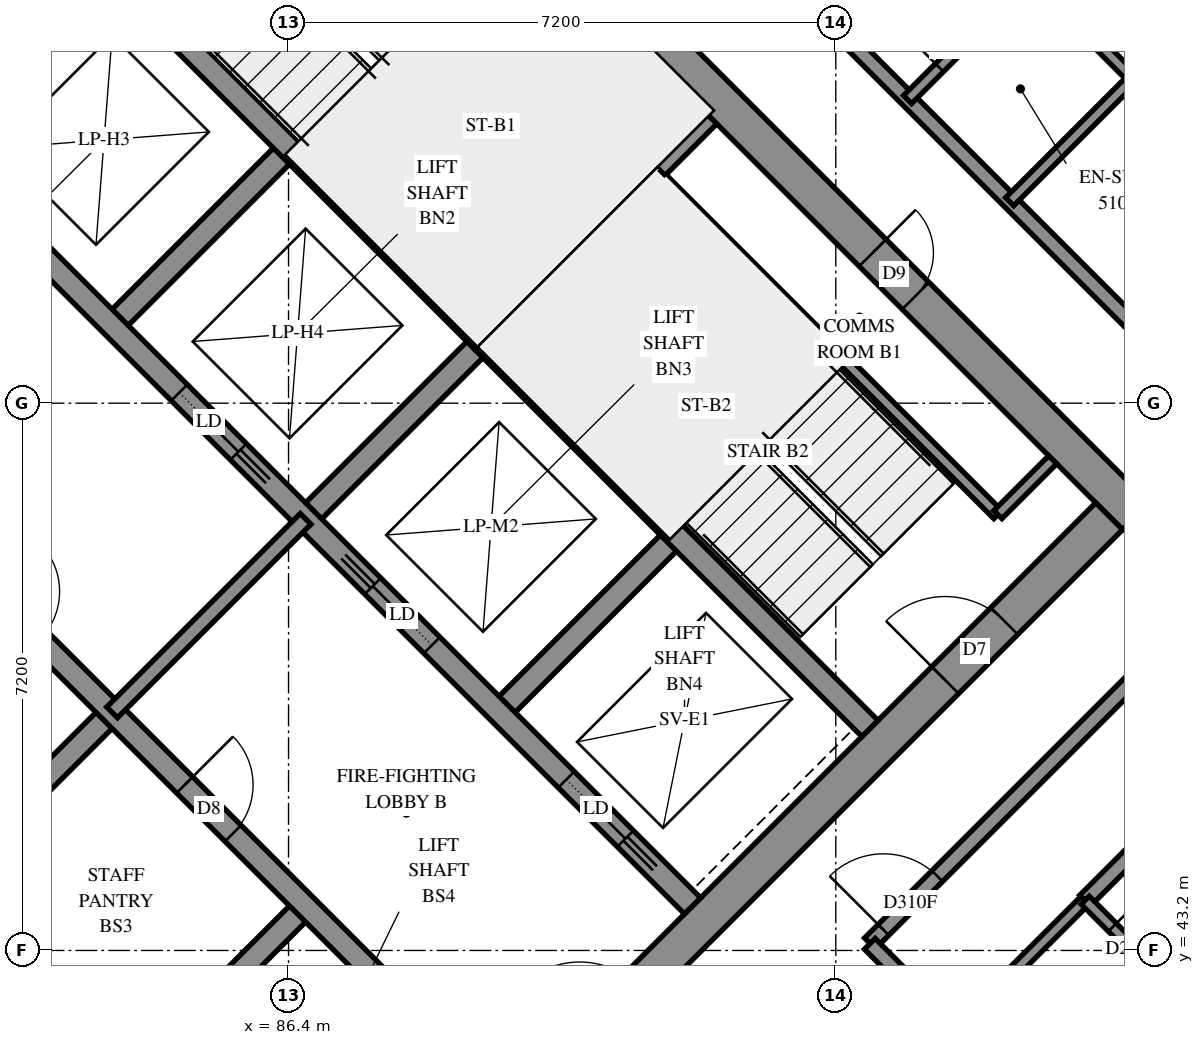
"""IFC4 building model, lengths in metres.
Left out: names, types, materials, properties, quantities, classifications, styles, units other than length and angle.
Written with IfcOpenShell. Run it as: python <this file> out.ifc"""

import sys

from ifc_helpers import new_model, si_unit, direction, frame, frame_2d, origin, place, context, subcontext, project, spatial, polyline, rectangle, outline, extrude, element, fill, save


model = new_model("IFC4")
c1 = context("Model", 3, precision=1e-05, world=origin(), true_north=direction((0.0, 1.0)))
c2 = subcontext(c1, "Body", "Model", "MODEL_VIEW")
j1 = project(units=[si_unit("LENGTHUNIT", "METRE"), si_unit("PLANEANGLEUNIT", "RADIAN")], contexts=[c1])
p1 = place(None, origin())
s1 = spatial("IfcSite", under=j1, at=p1, CompositionType="ELEMENT")
p2 = place(p1, origin())
s2 = spatial("IfcBuilding", under=s1, at=p2, CompositionType="ELEMENT")
p3 = place(p2, frame((0.0, 0.0, 189.6)))
s3 = spatial("IfcBuildingStorey", under=s2, at=p3, CompositionType="ELEMENT", Elevation=189.6)
p4 = place(p3, frame((76.124, 49.267, -0.3), z_axis=(0.0, 0.0, 1.0), x_axis=(0.7071067812, -0.7071067812, 0.0)))
e1 = element("IfcWall", 1, at=p4, inside=s3, PredefinedType="SHEAR", context=c2, shape_type="SweptSolid", body=[
    extrude(rectangle(XDim=15.4, YDim=0.5, at=frame_2d((7.7, 0.0))), origin(), (0.0, 0.0, 1.0), 2.7),
])
p5 = place(p3, frame((86.66, 59.802, -0.3), z_axis=(0.0, 0.0, 1.0), x_axis=(0.7071067812, -0.7071067812, 0.0)))
e2 = element("IfcWall", 2, at=p5, inside=s3, PredefinedType="SHEAR", context=c2, shape_type="SweptSolid", body=[
    extrude(rectangle(XDim=15.4, YDim=0.5, at=frame_2d((7.7, 0.0))), origin(), (0.0, 0.0, 1.0), 2.7),
])
p6 = place(p5, frame((10.5, 0.0, 0.3)))
e3 = element("IfcOpeningElement", 3, at=p6, cuts=e2, PredefinedType="OPENING", context=c2, shape_type="SweptSolid", body=[
    extrude(rectangle(XDim=0.8, YDim=2.1, at=frame_2d((0.4, 1.05))), frame((0.0, 0.26, 0.0), z_axis=(0.0, -1.0, 0.0), x_axis=(1.0, 0.0, 0.0)), (0.0, 0.0, 1.0), 0.52),
])
p7 = place(p3, frame((76.478, 49.267, -0.3), z_axis=(0.0, 0.0, 1.0), x_axis=(0.7071067812, 0.7071067812, 0.0)))
e4 = element("IfcWall", 4, at=p7, inside=s3, PredefinedType="SHEAR", context=c2, shape_type="SweptSolid", body=[
    extrude(rectangle(XDim=14.4, YDim=0.5, at=frame_2d((7.2, 0.0))), origin(), (0.0, 0.0, 1.0), 2.7),
])
p8 = place(p7, frame((4.55, 0.0, 0.3)))
e5 = element("IfcOpeningElement", 5, at=p8, cuts=e4, PredefinedType="OPENING", context=c2, shape_type="SweptSolid", body=[
    extrude(rectangle(XDim=1.1, YDim=2.1, at=frame_2d((0.55, 1.05))), frame((0.0, 0.26, 0.0), z_axis=(0.0, -1.0, 0.0), x_axis=(1.0, 0.0, 0.0)), (0.0, 0.0, 1.0), 0.52),
])
p9 = place(p7, frame((11.35, 0.0, 0.3)))
e6 = element("IfcOpeningElement", 6, at=p9, cuts=e4, PredefinedType="OPENING", context=c2, shape_type="SweptSolid", body=[
    extrude(rectangle(XDim=1.1, YDim=2.1, at=frame_2d((0.55, 1.05))), frame((0.0, 0.26, 0.0), z_axis=(0.0, -1.0, 0.0), x_axis=(1.0, 0.0, 0.0)), (0.0, 0.0, 1.0), 0.52),
])
p10 = place(p3, frame((87.013, 38.731, -0.3), z_axis=(0.0, 0.0, 1.0), x_axis=(0.7071067812, 0.7071067812, 0.0)))
e7 = element("IfcWall", 7, at=p10, inside=s3, PredefinedType="SHEAR", context=c2, shape_type="SweptSolid", body=[
    extrude(rectangle(XDim=14.4, YDim=0.5, at=frame_2d((7.2, 0.0))), origin(), (0.0, 0.0, 1.0), 2.7),
])
p11 = place(p10, frame((4.55, 0.0, 0.3)))
e8 = element("IfcOpeningElement", 8, at=p11, cuts=e7, PredefinedType="OPENING", context=c2, shape_type="SweptSolid", body=[
    extrude(rectangle(XDim=1.1, YDim=2.1, at=frame_2d((0.55, 1.05))), frame((0.0, 0.26, 0.0), z_axis=(0.0, -1.0, 0.0), x_axis=(1.0, 0.0, 0.0)), (0.0, 0.0, 1.0), 0.52),
])
p12 = place(p10, frame((11.35, 0.0, 0.3)))
e9 = element("IfcOpeningElement", 9, at=p12, cuts=e7, PredefinedType="OPENING", context=c2, shape_type="SweptSolid", body=[
    extrude(rectangle(XDim=1.1, YDim=2.1, at=frame_2d((0.55, 1.05))), frame((0.0, 0.26, 0.0), z_axis=(0.0, -1.0, 0.0), x_axis=(1.0, 0.0, 0.0)), (0.0, 0.0, 1.0), 0.52),
])
p13 = place(p3, frame((84.079, 51.423, 0.0), z_axis=(0.0, 0.0, 1.0), x_axis=(0.7071219326, 0.7070916295, 0.0)))
e10 = element("IfcWall", 10, at=p13, inside=s3, PredefinedType="SOLIDWALL", context=c2, shape_type="SweptSolid", body=[
    extrude(rectangle(XDim=3.3, YDim=0.3, at=frame_2d((1.65, 0.0))), origin(), (0.0, 0.0, 1.0), 3.1),
])
p14 = place(p3, frame((81.746, 43.999, 0.0), z_axis=(0.0, 0.0, 1.0), x_axis=(0.7071067812, 0.7071067812, 0.0)))
e11 = element("IfcWall", 11, at=p14, inside=s3, PredefinedType="SOLIDWALL", context=c2, shape_type="SweptSolid", body=[
    extrude(rectangle(XDim=3.3, YDim=0.3, at=frame_2d((1.65, 0.0))), origin(), (0.0, 0.0, 1.0), 3.1),
])
p15 = place(p3, frame((86.625, 48.878, 0.0), z_axis=(0.0, 0.0, 1.0), x_axis=(0.7071067812, 0.7071067812, 0.0)))
e12 = element("IfcWall", 12, at=p15, inside=s3, PredefinedType="SOLIDWALL", context=c2, shape_type="SweptSolid", body=[
    extrude(rectangle(XDim=3.3, YDim=0.3, at=frame_2d((1.65, 0.0))), origin(), (0.0, 0.0, 1.0), 3.1),
])
p16 = place(p3, frame((84.291, 41.453, 0.0), z_axis=(0.0, 0.0, 1.0), x_axis=(0.7071067812, 0.7071067812, 0.0)))
e13 = element("IfcWall", 13, at=p16, inside=s3, PredefinedType="SOLIDWALL", context=c2, shape_type="SweptSolid", body=[
    extrude(rectangle(XDim=3.3, YDim=0.3, at=frame_2d((1.65, 0.0))), origin(), (0.0, 0.0, 1.0), 3.1),
])
p17 = place(p3, frame((89.17, 46.332, 0.0), z_axis=(0.0, 0.0, 1.0), x_axis=(0.7071067812, 0.7071067812, 0.0)))
e14 = element("IfcWall", 14, at=p17, inside=s3, PredefinedType="SOLIDWALL", context=c2, shape_type="SweptSolid", body=[
    extrude(rectangle(XDim=3.3, YDim=0.3, at=frame_2d((1.65, 0.0))), origin(), (0.0, 0.0, 1.0), 3.1),
])
p18 = place(p3, frame((78.988, 51.423, 0.0), z_axis=(0.0, 0.0, 1.0), x_axis=(0.7071067812, -0.7071067812, 0.0)))
e15 = element("IfcWall", 15, at=p18, inside=s3, PredefinedType="SOLIDWALL", context=c2, shape_type="SweptSolid", body=[
    extrude(rectangle(XDim=14.4, YDim=0.3, at=frame_2d((7.2, 0.0))), origin(), (0.0, 0.0, 1.0), 3.1),
])
p19 = place(p18, frame((1.35, 0.0, 0.0)))
e16 = element("IfcOpeningElement", 16, at=p19, cuts=e15, PredefinedType="OPENING", context=c2, shape_type="SweptSolid", body=[
    extrude(rectangle(XDim=0.9, YDim=2.1, at=frame_2d((0.45, 1.05))), frame((0.0, 0.16, 0.0), z_axis=(0.0, -1.0, 0.0), x_axis=(1.0, 0.0, 0.0)), (0.0, 0.0, 1.0), 0.32),
])
p20 = place(p18, frame((4.95, 0.0, 0.0)))
e17 = element("IfcOpeningElement", 17, at=p20, cuts=e15, PredefinedType="OPENING", context=c2, shape_type="SweptSolid", body=[
    extrude(rectangle(XDim=0.9, YDim=2.1, at=frame_2d((0.45, 1.05))), frame((0.0, 0.16, 0.0), z_axis=(0.0, -1.0, 0.0), x_axis=(1.0, 0.0, 0.0)), (0.0, 0.0, 1.0), 0.32),
])
p21 = place(p18, frame((8.55, 0.0, 0.0)))
e18 = element("IfcOpeningElement", 18, at=p21, cuts=e15, PredefinedType="OPENING", context=c2, shape_type="SweptSolid", body=[
    extrude(rectangle(XDim=0.9, YDim=2.1, at=frame_2d((0.45, 1.05))), frame((0.0, 0.16, 0.0), z_axis=(0.0, -1.0, 0.0), x_axis=(1.0, 0.0, 0.0)), (0.0, 0.0, 1.0), 0.32),
])
p22 = place(p18, frame((12.05, 0.0, 0.0)))
e19 = element("IfcOpeningElement", 19, at=p22, cuts=e15, PredefinedType="OPENING", context=c2, shape_type="SweptSolid", body=[
    extrude(rectangle(XDim=1.1, YDim=2.1, at=frame_2d((0.55, 1.05))), frame((0.0, 0.16, 0.0), z_axis=(0.0, -1.0, 0.0), x_axis=(1.0, 0.0, 0.0)), (0.0, 0.0, 1.0), 0.32),
])
p23 = place(p3, frame((81.534, 53.969, 0.0), z_axis=(0.0, 0.0, 1.0), x_axis=(0.707103309, -0.7071102534, 0.0)))
e20 = element("IfcWall", 20, at=p23, inside=s3, PredefinedType="SOLIDWALL", context=c2, shape_type="SweptSolid", body=[
    extrude(rectangle(XDim=14.4, YDim=0.3, at=frame_2d((7.2, 0.0))), origin(), (0.0, 0.0, 1.0), 3.1),
])
p24 = place(p23, frame((1.25, 0.0, 0.0)))
e21 = element("IfcOpeningElement", 21, at=p24, cuts=e20, PredefinedType="OPENING", context=c2, shape_type="SweptSolid", body=[
    extrude(rectangle(XDim=1.1, YDim=2.1, at=frame_2d((0.55, 1.05))), frame((0.0, 0.16, 0.0), z_axis=(0.0, -1.0, 0.0), x_axis=(1.0, 0.0, 0.0)), (0.0, 0.0, 1.0), 0.32),
])
p25 = place(p23, frame((4.85, 0.0, 0.0)))
e22 = element("IfcOpeningElement", 22, at=p25, cuts=e20, PredefinedType="OPENING", context=c2, shape_type="SweptSolid", body=[
    extrude(rectangle(XDim=1.1, YDim=2.1, at=frame_2d((0.55, 1.05))), frame((0.0, 0.16, 0.0), z_axis=(0.0, -1.0, 0.0), x_axis=(1.0, 0.0, 0.0)), (0.0, 0.0, 1.0), 0.32),
])
p26 = place(p23, frame((8.45, 0.0, 0.0)))
e23 = element("IfcOpeningElement", 23, at=p26, cuts=e20, PredefinedType="OPENING", context=c2, shape_type="SweptSolid", body=[
    extrude(rectangle(XDim=1.1, YDim=2.1, at=frame_2d((0.55, 1.05))), frame((0.0, 0.16, 0.0), z_axis=(0.0, -1.0, 0.0), x_axis=(1.0, 0.0, 0.0)), (0.0, 0.0, 1.0), 0.32),
])
p27 = place(p23, frame((12.05, 0.0, 0.0)))
e24 = element("IfcOpeningElement", 24, at=p27, cuts=e20, PredefinedType="OPENING", context=c2, shape_type="SweptSolid", body=[
    extrude(rectangle(XDim=1.1, YDim=2.1, at=frame_2d((0.55, 1.05))), frame((0.0, 0.16, 0.0), z_axis=(0.0, -1.0, 0.0), x_axis=(1.0, 0.0, 0.0)), (0.0, 0.0, 1.0), 0.32),
])
for number, where, z_axis, x_axis in (
    (25, (83.867, 56.302, 0.0), (0.0, 0.0, 1.0), (0.707, -0.707, 0.0)),
    (26, (88.958, 51.211, 0.0), (0.0, 0.0, 1.0), (0.707, -0.707, 0.0)),
):
    element("IfcWall", number, at=place(p3, frame(where, z_axis=z_axis, x_axis=x_axis)), inside=s3, PredefinedType="SOLIDWALL", context=c2, shape_type="SweptSolid", body=[
        extrude(rectangle(XDim=7.2, YDim=0.3, at=frame_2d((3.6, 0.0))), origin(), (0.0, 0.0, 1.0), 3.1),
    ])
p28 = place(p3, frame((88.958, 51.211, 0.0), z_axis=(0.0, 0.0, 1.0), x_axis=(0.7071067812, 0.7071067812, 0.0)))
e27 = element("IfcWall", 27, at=p28, inside=s3, PredefinedType="SOLIDWALL", context=c2, shape_type="SweptSolid", body=[
    extrude(rectangle(XDim=4.2, YDim=0.3, at=frame_2d((2.1, 0.0))), origin(), (0.0, 0.0, 1.0), 3.1),
])
p29 = place(p3, frame((98.288, 54.678, 0.0), z_axis=(0.0, 0.0, 1.0), x_axis=(-0.7677573222, 0.6407407387, 0.0)))
e28 = element("IfcWall", 28, at=p29, inside=s3, PredefinedType="SOLIDWALL", context=c2, shape_type="SweptSolid", body=[
    extrude(outline(polyline([(-0.022, -0.25), (3.318, -0.25), (3.363, 0.25), (0.022, 0.25), (-0.022, -0.25)])), origin(), (0.0, 0.0, 1.0), 3.1),
])
p30 = place(p29, frame((1.144, 0.0, 0.45)))
e29 = element("IfcOpeningElement", 29, at=p30, cuts=e28, PredefinedType="OPENING", context=c2, shape_type="SweptSolid", body=[
    extrude(rectangle(XDim=1.2, YDim=2.5, at=frame_2d((0.6, 1.25))), frame((0.0, 0.26, 0.0), z_axis=(0.0, -1.0, 0.0), x_axis=(1.0, 0.0, 0.0)), (0.0, 0.0, 1.0), 0.52),
])
p31 = place(p3, frame((91.313, 53.354, 0.0), z_axis=(0.0, 0.0, 1.0), x_axis=(0.7071147811, -0.7070987812, 0.0)))
e30 = element("IfcWall", 30, at=p31, inside=s3, PredefinedType="PARTITIONING", context=c2, shape_type="SweptSolid", body=[
    extrude(rectangle(XDim=6.25, YDim=0.15, at=frame_2d((3.125, 0.0))), origin(), (0.0, 0.0, 1.0), 3.1),
])
p32 = place(p3, frame((95.732, 48.934, 0.0), z_axis=(0.0, 0.0, 1.0), x_axis=(0.7071067812, 0.7071067812, 0.0)))
e31 = element("IfcWall", 31, at=p32, inside=s3, PredefinedType="PARTITIONING", context=c2, shape_type="SweptSolid", body=[
    extrude(rectangle(XDim=1.02, YDim=0.15, at=frame_2d((0.51, 0.0))), origin(), (0.0, 0.0, 1.0), 3.1),
])
p33 = place(p3, frame((84.079, 46.332, 0.0), z_axis=(0.0, 0.0, 1.0), x_axis=(0.7071067812, 0.7071067812, 0.0)))
e32 = element("IfcWall", 32, at=p33, inside=s3, PredefinedType="PARTITIONING", context=c2, shape_type="SweptSolid", body=[
    extrude(rectangle(XDim=3.6, YDim=0.2, at=frame_2d((1.8, 0.0))), origin(), (0.0, 0.0, 1.0), 3.1),
])
p34 = place(p3, frame((93.346, 55.599, 0.0), z_axis=(0.0, 0.0, 1.0), x_axis=(0.7071067812, -0.7071067812, 0.0)))
e33 = element("IfcWall", 33, at=p34, inside=s3, PredefinedType="PARTITIONING", context=c2, shape_type="SweptSolid", body=[
    extrude(rectangle(XDim=9.201, YDim=0.2, at=frame_2d((4.601, 0.0))), origin(), (0.0, 0.0, 1.0), 3.1),
])
p35 = place(p3, frame((94.049, 43.293, 0.0), z_axis=(0.0, 0.0, 1.0), x_axis=(0.7071067812, 0.7071067812, 0.0)))
e34 = element("IfcWall", 34, at=p35, inside=s3, PredefinedType="PARTITIONING", context=c2, shape_type="SweptSolid", body=[
    extrude(rectangle(XDim=8.2, YDim=0.2, at=frame_2d((4.1, 0.0))), origin(), (0.0, 0.0, 1.0), 3.1),
])
p36 = place(p35, frame((0.252, 0.0, 0.0)))
e35 = element("IfcOpeningElement", 35, at=p36, cuts=e34, PredefinedType="OPENING", context=c2, shape_type="SweptSolid", body=[
    extrude(rectangle(XDim=1.0, YDim=2.1, at=frame_2d((0.5, 1.05))), frame((0.0, 0.11, 0.0), z_axis=(0.0, -1.0, 0.0), x_axis=(1.0, 0.0, 0.0)), (0.0, 0.0, 1.0), 0.22),
])
p37 = place(p3, frame((94.047, 43.287, 0.0), z_axis=(0.0, 0.0, 1.0), x_axis=(0.7071067812, -0.7071067812, 0.0)))
e36 = element("IfcWall", 36, at=p37, inside=s3, PredefinedType="PARTITIONING", context=c2, shape_type="SweptSolid", body=[
    extrude(rectangle(XDim=5.199, YDim=0.2, at=frame_2d((2.599, 0.0))), origin(), (0.0, 0.0, 1.0), 3.1),
])
p38 = place(p37, frame((3.898, 0.0, 0.0)))
e37 = element("IfcOpeningElement", 37, at=p38, cuts=e36, PredefinedType="OPENING", context=c2, shape_type="SweptSolid", body=[
    extrude(rectangle(XDim=0.9, YDim=2.1, at=frame_2d((0.45, 1.05))), frame((0.0, 0.11, 0.0), z_axis=(0.0, -1.0, 0.0), x_axis=(1.0, 0.0, 0.0)), (0.0, 0.0, 1.0), 0.22),
])
p39 = place(p3, frame((96.88, 43.856, 0.0), z_axis=(0.0, 0.0, 1.0), x_axis=(0.7074098182, 0.7068036142, 0.0)))
e38 = element("IfcWall", 38, at=p39, inside=s3, PredefinedType="PARTITIONING", context=c2, shape_type="SweptSolid", body=[
    extrude(rectangle(XDim=3.299, YDim=0.2, at=frame_2d((1.65, 0.0))), origin(), (0.0, 0.0, 1.0), 3.1),
])
p40 = place(p3, frame((95.887, 53.051, 0.0), z_axis=(0.0, 0.0, 1.0), x_axis=(0.7071067812, 0.7071067812, 0.0)))
e39 = element("IfcWall", 39, at=p40, inside=s3, PredefinedType="PARTITIONING", context=c2, shape_type="SweptSolid", body=[
    extrude(rectangle(XDim=2.548, YDim=0.15, at=frame_2d((1.274, 0.0))), origin(), (0.0, 0.0, 1.0), 3.1),
])
p41 = place(p3, frame((95.179, 42.161, 0.0), z_axis=(0.0, 0.0, 1.0), x_axis=(0.7071067812, 0.7071067812, 0.0)))
e40 = element("IfcWall", 40, at=p41, inside=s3, PredefinedType="PARTITIONING", context=c2, shape_type="SweptSolid", body=[
    extrude(rectangle(XDim=2.401, YDim=0.15, at=frame_2d((1.201, 0.0))), origin(), (0.0, 0.0, 1.0), 3.1),
])
p42 = place(p3, frame((94.544, 54.394, 0.0), z_axis=(0.0, 0.0, 1.0), x_axis=(0.7070857442, 0.7071278176, 0.0)))
e41 = element("IfcWall", 41, at=p42, inside=s3, PredefinedType="PARTITIONING", context=c2, shape_type="SweptSolid", body=[
    extrude(rectangle(XDim=2.377, YDim=0.15, at=frame_2d((1.188, 0.0))), origin(), (0.0, 0.0, 1.0), 3.1),
])
p43 = place(p42, frame((0.594, 0.0, 0.0)))
e42 = element("IfcOpeningElement", 42, at=p43, cuts=e41, PredefinedType="OPENING", context=c2, shape_type="SweptSolid", body=[
    extrude(rectangle(XDim=0.8, YDim=2.1, at=frame_2d((0.4, 1.05))), frame((0.0, 0.085, 0.0), z_axis=(0.0, -1.0, 0.0), x_axis=(1.0, 0.0, 0.0)), (0.0, 0.0, 1.0), 0.17),
])
p44 = place(p3, frame((96.881, 43.861, 0.0), z_axis=(0.0, 0.0, 1.0), x_axis=(0.7071067812, -0.7071067812, 0.0)))
e43 = element("IfcWall", 43, at=p44, inside=s3, PredefinedType="PARTITIONING", context=c2, shape_type="SweptSolid", body=[
    extrude(rectangle(XDim=1.901, YDim=0.15, at=frame_2d((0.95, 0.0))), origin(), (0.0, 0.0, 1.0), 3.1),
])
p45 = place(p44, frame((0.505, 0.0, 0.0)))
e44 = element("IfcOpeningElement", 44, at=p45, cuts=e43, PredefinedType="OPENING", context=c2, shape_type="SweptSolid", body=[
    extrude(rectangle(XDim=0.8, YDim=2.1, at=frame_2d((0.4, 1.05))), frame((0.0, 0.085, 0.0), z_axis=(0.0, -1.0, 0.0), x_axis=(1.0, 0.0, 0.0)), (0.0, 0.0, 1.0), 0.17),
])
p46 = place(p3, frame((96.191, 55.993, 0.0), z_axis=(0.0, 0.0, 1.0), x_axis=(0.7071067812, -0.7071067812, 0.0)))
e45 = element("IfcWall", 45, at=p46, inside=s3, PredefinedType="PARTITIONING", context=c2, shape_type="SweptSolid", body=[
    extrude(rectangle(XDim=1.867, YDim=0.15, at=frame_2d((0.933, 0.0))), origin(), (0.0, 0.0, 1.0), 3.1),
])
p47 = place(p6, origin())
e46 = element("IfcDoor", 46, at=p47, inside=s3, OperationType="SINGLE_SWING_RIGHT", PredefinedType="DOOR", context=c2, shape_type="SweptSolid", body=[
    extrude(rectangle(XDim=0.8, YDim=2.1, at=frame_2d((0.4, 1.05))), frame((0.0, 0.025, 0.0), z_axis=(0.0, -1.0, 0.0), x_axis=(1.0, 0.0, 0.0)), (0.0, 0.0, 1.0), 0.05),
])
fill(e3, e46)
p48 = place(p12, origin())
e47 = element("IfcDoor", 47, at=p48, inside=s3, OperationType="SINGLE_SWING_RIGHT", PredefinedType="DOOR", context=c2, shape_type="SweptSolid", body=[
    extrude(rectangle(XDim=1.1, YDim=2.1, at=frame_2d((0.55, 1.05))), frame((0.0, 0.025, 0.0), z_axis=(0.0, -1.0, 0.0), x_axis=(1.0, 0.0, 0.0)), (0.0, 0.0, 1.0), 0.05),
])
fill(e9, e47)
p49 = place(p21, origin())
e48 = element("IfcDoor", 48, at=p49, inside=s3, OperationType="SINGLE_SWING_LEFT", PredefinedType="DOOR", context=c2, shape_type="SweptSolid", body=[
    extrude(rectangle(XDim=0.9, YDim=2.1, at=frame_2d((0.45, 1.05))), frame((0.0, 0.025, 0.0), z_axis=(0.0, -1.0, 0.0), x_axis=(1.0, 0.0, 0.0)), (0.0, 0.0, 1.0), 0.05),
])
fill(e18, e48)
p50 = place(p25, origin())
e49 = element("IfcDoor", 49, at=p50, inside=s3, OperationType="SLIDING_TO_RIGHT", PredefinedType="DOOR", context=c2, shape_type="SweptSolid", body=[
    extrude(rectangle(XDim=1.1, YDim=2.1, at=frame_2d((0.55, 1.05))), frame((0.0, 0.025, 0.0), z_axis=(0.0, -1.0, 0.0), x_axis=(1.0, 0.0, 0.0)), (0.0, 0.0, 1.0), 0.05),
])
fill(e22, e49)
p51 = place(p26, origin())
e50 = element("IfcDoor", 50, at=p51, inside=s3, OperationType="SLIDING_TO_LEFT", PredefinedType="DOOR", context=c2, shape_type="SweptSolid", body=[
    extrude(rectangle(XDim=1.1, YDim=2.1, at=frame_2d((0.55, 1.05))), frame((0.0, 0.025, 0.0), z_axis=(0.0, -1.0, 0.0), x_axis=(1.0, 0.0, 0.0)), (0.0, 0.0, 1.0), 0.05),
])
fill(e23, e50)
p52 = place(p27, origin())
e51 = element("IfcDoor", 51, at=p52, inside=s3, OperationType="SLIDING_TO_RIGHT", PredefinedType="DOOR", context=c2, shape_type="SweptSolid", body=[
    extrude(rectangle(XDim=1.1, YDim=2.1, at=frame_2d((0.55, 1.05))), frame((0.0, 0.025, 0.0), z_axis=(0.0, -1.0, 0.0), x_axis=(1.0, 0.0, 0.0)), (0.0, 0.0, 1.0), 0.05),
])
fill(e24, e51)
p53 = place(p36, origin())
e52 = element("IfcDoor", 52, at=p53, inside=s3, OperationType="SINGLE_SWING_RIGHT", PredefinedType="DOOR", context=c2, shape_type="SweptSolid", body=[
    extrude(rectangle(XDim=1.0, YDim=2.1, at=frame_2d((0.5, 1.05))), frame((0.0, 0.025, 0.0), z_axis=(0.0, -1.0, 0.0), x_axis=(1.0, 0.0, 0.0)), (0.0, 0.0, 1.0), 0.05),
])
fill(e35, e52)
p54 = place(p43, origin())
e53 = element("IfcDoor", 53, at=p54, inside=s3, OperationType="SINGLE_SWING_RIGHT", PredefinedType="DOOR", context=c2, shape_type="SweptSolid", body=[
    extrude(rectangle(XDim=0.8, YDim=2.1, at=frame_2d((0.4, 1.05))), frame((0.0, 0.025, 0.0), z_axis=(0.0, -1.0, 0.0), x_axis=(1.0, 0.0, 0.0)), (0.0, 0.0, 1.0), 0.05),
])
fill(e42, e53)
p55 = place(p45, origin())
e54 = element("IfcDoor", 54, at=p55, inside=s3, OperationType="SINGLE_SWING_RIGHT", PredefinedType="DOOR", context=c2, shape_type="SweptSolid", body=[
    extrude(rectangle(XDim=0.8, YDim=2.1, at=frame_2d((0.4, 1.05))), frame((0.0, 0.025, 0.0), z_axis=(0.0, -1.0, 0.0), x_axis=(1.0, 0.0, 0.0)), (0.0, 0.0, 1.0), 0.05),
])
fill(e44, e54)
save(model, sys.argv[1])
